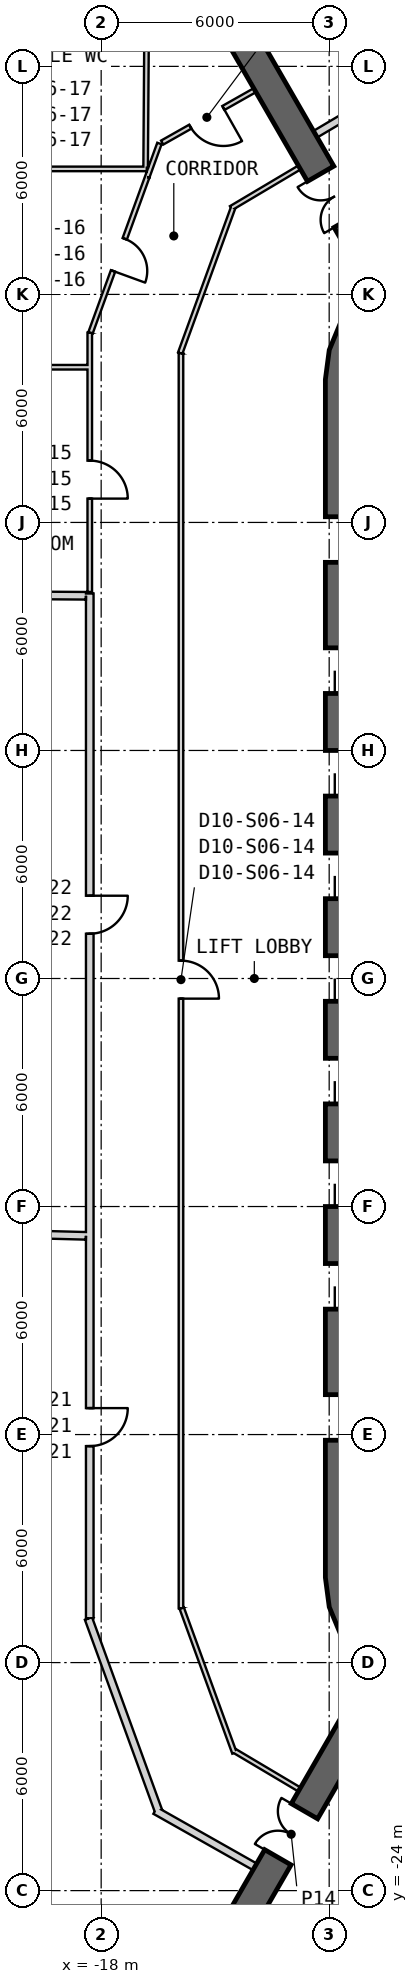
"""IFC4 building model, lengths in metres.
Left out: names, types, materials, properties, quantities, classifications, styles, units other than length and angle.
Written with IfcOpenShell. Run it as: python <this file> out.ifc"""

import sys

from ifc_helpers import new_model, si_unit, direction, frame, frame_2d, origin, place, context, subcontext, project, spatial, polyline, rectangle, outline, extrude, element, fill, save


model = new_model("IFC4")
c1 = context("Model", 3, precision=1e-05, world=origin(), true_north=direction((0.0, 1.0)))
c2 = subcontext(c1, "Body", "Model", "MODEL_VIEW")
j1 = project(units=[si_unit("LENGTHUNIT", "METRE"), si_unit("PLANEANGLEUNIT", "RADIAN")], contexts=[c1])
p1 = place(None, origin())
s1 = spatial("IfcSite", under=j1, at=p1, CompositionType="ELEMENT")
p2 = place(p1, origin())
s2 = spatial("IfcBuilding", under=s1, at=p2, CompositionType="ELEMENT")
p3 = place(p2, frame((0.0, 0.0, 119.3)))
s3 = spatial("IfcBuildingStorey", under=s2, at=p3, CompositionType="ELEMENT", Elevation=119.3)
p4 = place(p3, frame((-11.65, 15.762, 0.0), z_axis=(0.0, 0.0, 1.0), x_axis=(0.0, -1.0, 0.0)))
e1 = element("IfcWall", 1, at=p4, inside=s3, PredefinedType="SHEAR", context=c2, shape_type="SweptSolid", body=[
    extrude(rectangle(XDim=31.523, YDim=0.9, at=frame_2d((15.762, 0.0))), origin(), (0.0, 0.0, 1.0), 4.1),
])
p5 = place(p4, frame((7.062, 0.0, 0.0)))
e2 = element("IfcOpeningElement", 2, at=p5, cuts=e1, PredefinedType="OPENING", context=c2, shape_type="SweptSolid", body=[
    extrude(rectangle(XDim=1.2, YDim=2.4, at=frame_2d((0.6, 1.2))), frame((0.0, 0.46, 0.0), z_axis=(0.0, -1.0, 0.0), x_axis=(1.0, 0.0, 0.0)), (0.0, 0.0, 1.0), 0.92),
])
p6 = place(p4, frame((9.762, 0.0, 0.0)))
e3 = element("IfcOpeningElement", 3, at=p6, cuts=e1, PredefinedType="OPENING", context=c2, shape_type="SweptSolid", body=[
    extrude(rectangle(XDim=1.2, YDim=2.4, at=frame_2d((0.6, 1.2))), frame((0.0, 0.46, 0.0), z_axis=(0.0, -1.0, 0.0), x_axis=(1.0, 0.0, 0.0)), (0.0, 0.0, 1.0), 0.92),
])
p7 = place(p4, frame((12.462, 0.0, 0.0)))
e4 = element("IfcOpeningElement", 4, at=p7, cuts=e1, PredefinedType="OPENING", context=c2, shape_type="SweptSolid", body=[
    extrude(rectangle(XDim=1.2, YDim=2.4, at=frame_2d((0.6, 1.2))), frame((0.0, 0.46, 0.0), z_axis=(0.0, -1.0, 0.0), x_axis=(1.0, 0.0, 0.0)), (0.0, 0.0, 1.0), 0.92),
])
p8 = place(p4, frame((15.162, 0.0, 0.0)))
e5 = element("IfcOpeningElement", 5, at=p8, cuts=e1, PredefinedType="OPENING", context=c2, shape_type="SweptSolid", body=[
    extrude(rectangle(XDim=1.2, YDim=2.4, at=frame_2d((0.6, 1.2))), frame((0.0, 0.46, 0.0), z_axis=(0.0, -1.0, 0.0), x_axis=(1.0, 0.0, 0.0)), (0.0, 0.0, 1.0), 0.92),
])
p9 = place(p4, frame((17.862, 0.0, 0.0)))
e6 = element("IfcOpeningElement", 6, at=p9, cuts=e1, PredefinedType="OPENING", context=c2, shape_type="SweptSolid", body=[
    extrude(rectangle(XDim=1.2, YDim=2.4, at=frame_2d((0.6, 1.2))), frame((0.0, 0.46, 0.0), z_axis=(0.0, -1.0, 0.0), x_axis=(1.0, 0.0, 0.0)), (0.0, 0.0, 1.0), 0.92),
])
p10 = place(p4, frame((20.562, 0.0, 0.0)))
e7 = element("IfcOpeningElement", 7, at=p10, cuts=e1, PredefinedType="OPENING", context=c2, shape_type="SweptSolid", body=[
    extrude(rectangle(XDim=1.2, YDim=2.4, at=frame_2d((0.6, 1.2))), frame((0.0, 0.46, 0.0), z_axis=(0.0, -1.0, 0.0), x_axis=(1.0, 0.0, 0.0)), (0.0, 0.0, 1.0), 0.92),
])
p11 = place(p4, frame((23.262, 0.0, 0.0)))
e8 = element("IfcOpeningElement", 8, at=p11, cuts=e1, PredefinedType="OPENING", context=c2, shape_type="SweptSolid", body=[
    extrude(rectangle(XDim=1.2, YDim=2.4, at=frame_2d((0.6, 1.2))), frame((0.0, 0.46, 0.0), z_axis=(0.0, -1.0, 0.0), x_axis=(1.0, 0.0, 0.0)), (0.0, 0.0, 1.0), 0.92),
])
p12 = place(p4, frame((3.612, 0.0, 0.0)))
e9 = element("IfcOpeningElement", 9, at=p12, cuts=e1, PredefinedType="OPENING", context=c2, shape_type="SweptSolid", body=[
    extrude(rectangle(XDim=1.2, YDim=2.4, at=frame_2d((0.6, 1.2))), frame((0.0, 0.46, 0.0), z_axis=(0.0, -1.0, 0.0), x_axis=(1.0, 0.0, 0.0)), (0.0, 0.0, 1.0), 0.92),
])
p13 = place(p4, frame((26.712, 0.0, 0.0)))
e10 = element("IfcOpeningElement", 10, at=p13, cuts=e1, PredefinedType="OPENING", context=c2, shape_type="SweptSolid", body=[
    extrude(rectangle(XDim=1.2, YDim=2.4, at=frame_2d((0.6, 1.2))), frame((0.0, 0.46, 0.0), z_axis=(0.0, -1.0, 0.0), x_axis=(1.0, 0.0, 0.0)), (0.0, 0.0, 1.0), 0.92),
])
p14 = place(p3, origin())
e11 = element("IfcWall", 11, at=p14, inside=s3, PredefinedType="SHEAR", context=c2, shape_type="SweptSolid", body=[
    extrude(outline(polyline([(-7.6, 18.36), (-8.323, 18.659), (-9.1, 18.762), (-9.876, 18.659), (-10.6, 18.36), (-11.221, 17.883), (-11.698, 17.262), (-11.998, 16.538), (-12.1, 15.762), (-11.2, 15.762), (-11.128, 16.305), (-10.919, 16.812), (-10.585, 17.247), (-10.15, 17.58), (-9.644, 17.79), (-9.1, 17.862), (-8.556, 17.79), (-8.05, 17.58), (-7.6, 18.36)])), origin(), (0.0, 0.0, 1.0), 4.1),
])
p15 = place(p3, origin())
e12 = element("IfcWall", 12, at=p15, inside=s3, PredefinedType="SHEAR", context=c2, shape_type="SweptSolid", body=[
    extrude(outline(polyline([(-12.1, -15.762), (-11.998, -16.538), (-11.698, -17.262), (-11.221, -17.883), (-10.6, -18.36), (-9.876, -18.659), (-9.1, -18.762), (-8.323, -18.659), (-7.6, -18.36), (-8.05, -17.58), (-8.556, -17.79), (-9.1, -17.862), (-9.644, -17.79), (-10.15, -17.58), (-10.585, -17.247), (-10.919, -16.812), (-11.128, -16.305), (-11.2, -15.762), (-12.1, -15.762)])), origin(), (0.0, 0.0, 1.0), 4.1),
])
p16 = place(p3, frame((-10.575, 18.316, 0.0), z_axis=(0.0, 0.0, 1.0), x_axis=(-0.500008359956, 0.866020577108, 0.0)))
e13 = element("IfcWall", 13, at=p16, inside=s3, PredefinedType="SHEAR", context=c2, shape_type="SweptSolid", body=[
    extrude(rectangle(XDim=12.812, YDim=0.8, at=frame_2d((6.406, 0.0))), origin(), (0.0, 0.0, 1.0), 4.1),
])
p17 = place(p16, frame((1.9, 0.0, 0.0)))
e14 = element("IfcOpeningElement", 14, at=p17, cuts=e13, PredefinedType="OPENING", context=c2, shape_type="SweptSolid", body=[
    extrude(rectangle(XDim=1.4, YDim=2.4, at=frame_2d((0.7, 1.2))), frame((0.0, 0.41, 0.0), z_axis=(0.0, -1.0, 0.0), x_axis=(1.0, 0.0, 0.0)), (0.0, 0.0, 1.0), 0.82),
])
p18 = place(p3, frame((-10.575, -18.316, 0.0), z_axis=(0.0, 0.0, 1.0), x_axis=(-0.500008359956, -0.866020577108, 0.0)))
e15 = element("IfcWall", 15, at=p18, inside=s3, PredefinedType="SHEAR", context=c2, shape_type="SweptSolid", body=[
    extrude(rectangle(XDim=12.812, YDim=0.8, at=frame_2d((6.406, 0.0))), origin(), (0.0, 0.0, 1.0), 4.1),
])
p19 = place(p18, frame((4.15, 0.0, 0.0)))
e16 = element("IfcOpeningElement", 16, at=p19, cuts=e15, PredefinedType="OPENING", context=c2, shape_type="SweptSolid", body=[
    extrude(rectangle(XDim=1.4, YDim=2.4, at=frame_2d((0.7, 1.2))), frame((0.0, 0.41, 0.0), z_axis=(0.0, -1.0, 0.0), x_axis=(1.0, 0.0, 0.0)), (0.0, 0.0, 1.0), 0.82),
])
p20 = place(p3, frame((-12.782, 21.339, 0.0), z_axis=(0.0, 0.0, 1.0), x_axis=(-0.859769901207, -0.510681619973, 0.0)))
e17 = element("IfcWall", 17, at=p20, inside=s3, PredefinedType="PARTITIONING", context=c2, shape_type="SweptSolid", body=[
    extrude(rectangle(XDim=2.093, YDim=0.12, at=frame_2d((1.046, 0.0))), origin(), (0.0, 0.0, 1.0), 3.8),
])
p21 = place(p3, frame((-14.528, 20.282, 0.0), z_axis=(0.0, 0.0, 1.0), x_axis=(-0.341969257767, -0.939711140054, 0.0)))
e18 = element("IfcWall", 18, at=p21, inside=s3, PredefinedType="PARTITIONING", context=c2, shape_type="SweptSolid", body=[
    extrude(rectangle(XDim=4.073, YDim=0.12, at=frame_2d((2.037, 0.0))), origin(), (0.0, 0.0, 1.0), 2.88),
])
p22 = place(p3, frame((-15.9, 16.451, 0.0), z_axis=(0.0, 0.0, 1.0), x_axis=(0.0, -1.0, 0.0)))
e19 = element("IfcWall", 19, at=p22, inside=s3, PredefinedType="PARTITIONING", context=c2, shape_type="SweptSolid", body=[
    extrude(rectangle(XDim=33.022, YDim=0.12, at=frame_2d((16.511, 0.0))), origin(), (0.0, 0.0, 1.0), 2.98),
])
p23 = place(p22, frame((15.981, 0.0, 0.0)))
e20 = element("IfcOpeningElement", 20, at=p23, cuts=e19, PredefinedType="OPENING", context=c2, shape_type="SweptSolid", body=[
    extrude(rectangle(XDim=1.0, YDim=2.1, at=frame_2d((0.5, 1.05))), frame((0.0, 0.07, 0.0), z_axis=(0.0, -1.0, 0.0), x_axis=(1.0, 0.0, 0.0)), (0.0, 0.0, 1.0), 0.14),
])
p24 = place(p3, frame((-15.879, -16.567, 0.0), z_axis=(0.0, 0.0, 1.0), x_axis=(0.341999322503, -0.939700198685, 0.0)))
e21 = element("IfcWall", 21, at=p24, inside=s3, PredefinedType="PARTITIONING", context=c2, shape_type="SweptSolid", body=[
    extrude(rectangle(XDim=4.054, YDim=0.12, at=frame_2d((2.027, 0.0))), origin(), (0.0, 0.0, 1.0), 2.88),
])
p25 = place(p3, frame((-14.494, -20.322, 0.0), z_axis=(0.0, 0.0, 1.0), x_axis=(0.859745408261, -0.510722853389, 0.0)))
e22 = element("IfcWall", 22, at=p25, inside=s3, PredefinedType="PARTITIONING", context=c2, shape_type="SweptSolid", body=[
    extrude(rectangle(XDim=1.991, YDim=0.12, at=frame_2d((0.996, 0.0))), origin(), (0.0, 0.0, 1.0), 3.8),
])
p26 = place(p3, frame((-16.576, -21.892, 0.0), z_axis=(0.0, 0.0, 1.0), x_axis=(0.870559817111, -0.492062602553, 0.0)))
e23 = element("IfcWall", 23, at=p26, inside=s3, PredefinedType="PARTITIONING", context=c2, shape_type="SweptSolid", body=[
    extrude(rectangle(XDim=3.01, YDim=0.2, at=frame_2d((1.505, 0.0))), origin(), (0.0, 0.0, 1.0), 3.8),
])
p27 = place(p3, frame((-18.334, -16.84, 0.0), z_axis=(0.0, 0.0, 1.0), x_axis=(0.342015877493, -0.939694173411, 0.0)))
e24 = element("IfcWall", 24, at=p27, inside=s3, PredefinedType="PARTITIONING", context=c2, shape_type="SweptSolid", body=[
    extrude(rectangle(XDim=5.389, YDim=0.2, at=frame_2d((2.694, 0.0))), origin(), (0.0, 0.0, 1.0), 2.88),
])
p28 = place(p3, frame((-18.3, 10.13, 0.0), z_axis=(0.0, 0.0, 1.0), x_axis=(0.0, -1.0, 0.0)))
e25 = element("IfcWall", 25, at=p28, inside=s3, PredefinedType="PARTITIONING", context=c2, shape_type="SweptSolid", body=[
    extrude(rectangle(XDim=26.964, YDim=0.2, at=frame_2d((13.482, 0.0))), origin(), (0.0, 0.0, 1.0), 3.08),
])
p29 = place(p28, frame((21.434, 0.0, 0.0)))
e26 = element("IfcOpeningElement", 26, at=p29, cuts=e25, PredefinedType="OPENING", context=c2, shape_type="SweptSolid", body=[
    extrude(rectangle(XDim=1.0, YDim=2.1, at=frame_2d((0.5, 1.05))), frame((0.0, 0.11, 0.0), z_axis=(0.0, -1.0, 0.0), x_axis=(1.0, 0.0, 0.0)), (0.0, 0.0, 1.0), 0.22),
])
p30 = place(p28, frame((7.952, 0.0, 0.0)))
e27 = element("IfcOpeningElement", 27, at=p30, cuts=e25, PredefinedType="OPENING", context=c2, shape_type="SweptSolid", body=[
    extrude(rectangle(XDim=1.0, YDim=2.1, at=frame_2d((0.5, 1.05))), frame((0.0, 0.11, 0.0), z_axis=(0.0, -1.0, 0.0), x_axis=(1.0, 0.0, 0.0)), (0.0, 0.0, 1.0), 0.22),
])
p31 = place(p3, frame((-18.3, 16.994, 0.0), z_axis=(0.0, 0.0, 1.0), x_axis=(0.0, -1.0, 0.0)))
e28 = element("IfcWall", 28, at=p31, inside=s3, PredefinedType="PARTITIONING", context=c2, shape_type="SweptSolid", body=[
    extrude(rectangle(XDim=0.91, YDim=0.12, at=frame_2d((0.455, 0.0))), origin(), (0.0, 0.0, 1.0), 3.8),
])
p32 = place(p3, frame((-18.3, 16.084, 0.0), z_axis=(0.0, 0.0, 1.0), x_axis=(0.0, -1.0, 0.0)))
e29 = element("IfcWall", 29, at=p32, inside=s3, PredefinedType="PARTITIONING", context=c2, shape_type="SweptSolid", body=[
    extrude(rectangle(XDim=5.914, YDim=0.12, at=frame_2d((2.957, 0.0))), origin(), (0.0, 0.0, 1.0), 3.08),
])
p33 = place(p32, frame((2.457, 0.0, 0.0)))
e30 = element("IfcOpeningElement", 30, at=p33, cuts=e29, PredefinedType="OPENING", context=c2, shape_type="SweptSolid", body=[
    extrude(rectangle(XDim=1.0, YDim=2.1, at=frame_2d((0.5, 1.05))), frame((0.0, 0.07, 0.0), z_axis=(0.0, -1.0, 0.0), x_axis=(1.0, 0.0, 0.0)), (0.0, 0.0, 1.0), 0.14),
])
p34 = place(p3, frame((-16.467, 21.97, 0.0), z_axis=(0.0, 0.0, 1.0), x_axis=(-0.341973086836, -0.939709746613, 0.0)))
e31 = element("IfcWall", 31, at=p34, inside=s3, PredefinedType="PARTITIONING", context=c2, shape_type="SweptSolid", body=[
    extrude(rectangle(XDim=0.937, YDim=0.12, at=frame_2d((0.469, 0.0))), origin(), (0.0, 0.0, 1.0), 2.88),
])
p35 = place(p3, frame((-16.788, 21.09, 0.0), z_axis=(0.0, 0.0, 1.0), x_axis=(-0.342035154905, -0.939687156882, 0.0)))
e32 = element("IfcWall", 32, at=p35, inside=s3, PredefinedType="PARTITIONING", context=c2, shape_type="SweptSolid", body=[
    extrude(rectangle(XDim=4.362, YDim=0.12, at=frame_2d((2.181, 0.0))), origin(), (0.0, 0.0, 1.0), 2.98),
])
p36 = place(p35, frame((1.731, 0.0, 0.0)))
e33 = element("IfcOpeningElement", 33, at=p36, cuts=e32, PredefinedType="OPENING", context=c2, shape_type="SweptSolid", body=[
    extrude(rectangle(XDim=0.9, YDim=2.1, at=frame_2d((0.45, 1.05))), frame((0.0, 0.07, 0.0), z_axis=(0.0, -1.0, 0.0), x_axis=(1.0, 0.0, 0.0)), (0.0, 0.0, 1.0), 0.14),
])
p37 = place(p3, frame((-13.956, 23.373, 0.0), z_axis=(0.0, 0.0, 1.0), x_axis=(-0.870551471841, -0.492077366757, 0.0)))
e34 = element("IfcWall", 34, at=p37, inside=s3, PredefinedType="PARTITIONING", context=c2, shape_type="SweptSolid", body=[
    extrude(rectangle(XDim=2.8, YDim=0.12, at=frame_2d((1.4, 0.0))), origin(), (0.0, 0.0, 1.0), 3.8),
])
p38 = place(p37, frame((0.95, 0.0, 0.0)))
e35 = element("IfcOpeningElement", 35, at=p38, cuts=e34, PredefinedType="OPENING", context=c2, shape_type="SweptSolid", body=[
    extrude(rectangle(XDim=1.0, YDim=2.1, at=frame_2d((0.5, 1.05))), frame((0.0, 0.07, 0.0), z_axis=(0.0, -1.0, 0.0), x_axis=(1.0, 0.0, 0.0)), (0.0, 0.0, 1.0), 0.14),
])
p39 = place(p3, frame((-10.339, 23.415, 0.0), z_axis=(0.0, 0.0, 1.0), x_axis=(-0.860316803263, -0.509759745393, 0.0)))
e36 = element("IfcWall", 36, at=p39, inside=s3, PredefinedType="PARTITIONING", context=c2, shape_type="SweptSolid", body=[
    extrude(rectangle(XDim=2.354, YDim=0.2, at=frame_2d((1.177, 0.0))), origin(), (0.0, 0.0, 1.0), 3.8),
])
p40 = place(p3, frame((-18.4, -6.771, 0.0), z_axis=(0.0, 0.0, 1.0), x_axis=(-0.999660021388, 0.026073772986, 0.0)))
e37 = element("IfcWall", 37, at=p40, inside=s3, PredefinedType="PARTITIONING", context=c2, shape_type="SweptSolid", body=[
    extrude(rectangle(XDim=9.841, YDim=0.2, at=frame_2d((4.92, 0.0))), origin(), (0.0, 0.0, 1.0), 3.08),
])
p41 = place(p3, frame((-22.75, 10.099, 0.0), z_axis=(0.0, 0.0, 1.0), x_axis=(0.999978071859, -0.006622371337, 0.0)))
e38 = element("IfcWall", 38, at=p41, inside=s3, PredefinedType="PARTITIONING", context=c2, shape_type="SweptSolid", body=[
    extrude(rectangle(XDim=4.35, YDim=0.2, at=frame_2d((2.175, 0.0))), origin(), (0.0, 0.0, 1.0), 3.8),
])
p42 = place(p3, frame((-18.36, 16.084, 0.0), z_axis=(0.0, 0.0, 1.0), x_axis=(-1.0, 0.0, 0.0)))
e39 = element("IfcWall", 39, at=p42, inside=s3, PredefinedType="PARTITIONING", context=c2, shape_type="SweptSolid", body=[
    extrude(rectangle(XDim=4.39, YDim=0.12, at=frame_2d((2.195, 0.0))), origin(), (0.0, 0.0, 1.0), 3.8),
])
p43 = place(p3, frame((-16.8, 21.302, 0.0), z_axis=(0.0, 0.0, 1.0), x_axis=(-1.0, 0.0, 0.0)))
e40 = element("IfcWall", 40, at=p43, inside=s3, PredefinedType="PARTITIONING", context=c2, shape_type="SweptSolid", body=[
    extrude(rectangle(XDim=5.95, YDim=0.12, at=frame_2d((2.975, 0.0))), origin(), (0.0, 0.0, 1.0), 2.98),
])
p44 = place(p43, frame((2.525, 0.0, 0.0)))
e41 = element("IfcOpeningElement", 41, at=p44, cuts=e40, PredefinedType="OPENING", context=c2, shape_type="SweptSolid", body=[
    extrude(rectangle(XDim=0.9, YDim=2.1, at=frame_2d((0.45, 1.05))), frame((0.0, 0.07, 0.0), z_axis=(0.0, -1.0, 0.0), x_axis=(1.0, 0.0, 0.0)), (0.0, 0.0, 1.0), 0.14),
])
p45 = place(p3, frame((-16.83, 21.332, 0.0), z_axis=(0.0, 0.0, 1.0), x_axis=(0.006971081403, 0.999975701717, 0.0)))
e42 = element("IfcWall", 42, at=p45, inside=s3, PredefinedType="PARTITIONING", context=c2, shape_type="SweptSolid", body=[
    extrude(rectangle(XDim=4.238, YDim=0.12, at=frame_2d((2.119, 0.0))), origin(), (0.0, 0.0, 1.0), 2.88),
])
p46 = place(p23, origin())
e43 = element("IfcDoor", 43, at=p46, inside=s3, OperationType="SINGLE_SWING_RIGHT", PredefinedType="NOTDEFINED", context=c2, shape_type="SweptSolid", body=[
    extrude(rectangle(XDim=1.0, YDim=2.1, at=frame_2d((0.5, 1.05))), frame((0.0, 0.025, 0.0), z_axis=(0.0, -1.0, 0.0), x_axis=(1.0, 0.0, 0.0)), (0.0, 0.0, 1.0), 0.05),
])
fill(e20, e43)
p47 = place(p33, origin())
e44 = element("IfcDoor", 44, at=p47, inside=s3, OperationType="SINGLE_SWING_LEFT", PredefinedType="NOTDEFINED", context=c2, shape_type="SweptSolid", body=[
    extrude(rectangle(XDim=1.0, YDim=2.1, at=frame_2d((0.5, 1.05))), frame((0.0, 0.025, 0.0), z_axis=(0.0, -1.0, 0.0), x_axis=(1.0, 0.0, 0.0)), (0.0, 0.0, 1.0), 0.05),
])
fill(e30, e44)
p48 = place(p36, origin())
e45 = element("IfcDoor", 45, at=p48, inside=s3, OperationType="SINGLE_SWING_LEFT", PredefinedType="NOTDEFINED", context=c2, shape_type="SweptSolid", body=[
    extrude(rectangle(XDim=0.9, YDim=2.1, at=frame_2d((0.45, 1.05))), frame((0.0, 0.025, 0.0), z_axis=(0.0, -1.0, 0.0), x_axis=(1.0, 0.0, 0.0)), (0.0, 0.0, 1.0), 0.05),
])
fill(e33, e45)
p49 = place(p38, origin())
e46 = element("IfcDoor", 46, at=p49, inside=s3, OperationType="SINGLE_SWING_RIGHT", PredefinedType="NOTDEFINED", context=c2, shape_type="SweptSolid", body=[
    extrude(rectangle(XDim=1.0, YDim=2.1, at=frame_2d((0.5, 1.05))), frame((0.0, 0.025, 0.0), z_axis=(0.0, -1.0, 0.0), x_axis=(1.0, 0.0, 0.0)), (0.0, 0.0, 1.0), 0.05),
])
fill(e35, e46)
p50 = place(p29, origin())
e47 = element("IfcDoor", 47, at=p50, inside=s3, OperationType="SINGLE_SWING_LEFT", PredefinedType="USERDEFINED", context=c2, shape_type="SweptSolid", body=[
    extrude(rectangle(XDim=1.0, YDim=2.1, at=frame_2d((0.5, 1.05))), frame((0.0, 0.025, 0.0), z_axis=(0.0, -1.0, 0.0), x_axis=(1.0, 0.0, 0.0)), (0.0, 0.0, 1.0), 0.05),
])
fill(e26, e47)
p51 = place(p30, origin())
e48 = element("IfcDoor", 48, at=p51, inside=s3, OperationType="SINGLE_SWING_LEFT", PredefinedType="USERDEFINED", context=c2, shape_type="SweptSolid", body=[
    extrude(rectangle(XDim=1.0, YDim=2.1, at=frame_2d((0.5, 1.05))), frame((0.0, 0.025, 0.0), z_axis=(0.0, -1.0, 0.0), x_axis=(1.0, 0.0, 0.0)), (0.0, 0.0, 1.0), 0.05),
])
fill(e27, e48)
p52 = place(p17, origin())
e49 = element("IfcDoor", 49, at=p52, inside=s3, OperationType="DOUBLE_DOOR_SINGLE_SWING", PredefinedType="NOTDEFINED", context=c2, shape_type="SweptSolid", body=[
    extrude(rectangle(XDim=1.4, YDim=2.4, at=frame_2d((0.7, 1.2))), frame((0.0, 0.025, 0.0), z_axis=(0.0, -1.0, 0.0), x_axis=(1.0, 0.0, 0.0)), (0.0, 0.0, 1.0), 0.05),
])
fill(e14, e49)
p53 = place(p19, origin())
e50 = element("IfcDoor", 50, at=p53, inside=s3, OperationType="DOUBLE_DOOR_SINGLE_SWING", PredefinedType="NOTDEFINED", context=c2, shape_type="SweptSolid", body=[
    extrude(rectangle(XDim=1.4, YDim=2.4, at=frame_2d((0.7, 1.2))), frame((0.0, 0.025, 0.0), z_axis=(0.0, -1.0, 0.0), x_axis=(1.0, 0.0, 0.0)), (0.0, 0.0, 1.0), 0.05),
])
fill(e16, e50)
save(model, sys.argv[1])
